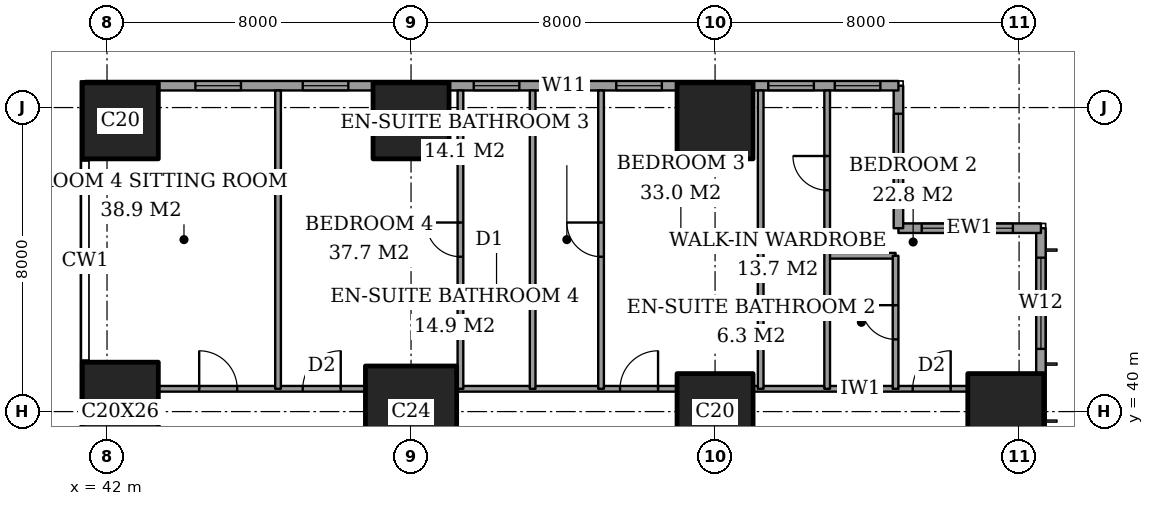
"""IFC4 building model, lengths in metres.
Left out: names, types, materials, properties, quantities, classifications, styles, units other than length and angle.
Written with IfcOpenShell. Run it as: python <this file> out.ifc"""

import sys

from ifc_helpers import new_model, si_unit, direction, frame, frame_2d, origin, origin_2d, place, context, subcontext, project, spatial, rectangle, extrude, element, fill, save


model = new_model("IFC4")
c1 = context("Model", 3, precision=1e-05, world=origin(), true_north=direction((0.0, 1.0)))
c2 = subcontext(c1, "Body", "Model", "MODEL_VIEW")
j1 = project(units=[si_unit("LENGTHUNIT", "METRE"), si_unit("PLANEANGLEUNIT", "RADIAN")], contexts=[c1])
p1 = place(None, origin())
s1 = spatial("IfcSite", under=j1, at=p1, CompositionType="ELEMENT")
p2 = place(p1, origin())
s2 = spatial("IfcBuilding", under=s1, at=p2, CompositionType="ELEMENT")
p3 = place(p2, frame((0.0, 0.0, 164.6)))
s3 = spatial("IfcBuildingStorey", under=s2, at=p3, CompositionType="ELEMENT", Elevation=164.6)
p4 = place(p3, frame((42.35, 40.0, 0.0), z_axis=(0.0, 0.0, 1.0), x_axis=(1.0, 0.0, 0.0)))
e1 = element("IfcColumn", 1, at=p4, inside=s3, PredefinedType="COLUMN", context=c2, shape_type="SweptSolid", body=[
    extrude(rectangle(XDim=2.0, YDim=2.6, at=origin_2d()), origin(), (0.0, 0.0, 1.0), 3.6),
])
p5 = place(p3, frame((42.35, 47.65, 0.0), z_axis=(0.0, 0.0, 1.0), x_axis=(1.0, 0.0, 0.0)))
e2 = element("IfcColumn", 2, at=p5, inside=s3, PredefinedType="COLUMN", context=c2, shape_type="SweptSolid", body=[
    extrude(rectangle(XDim=2.0, YDim=2.0, at=origin_2d()), origin(), (0.0, 0.0, 1.0), 3.6),
])
p6 = place(p3, frame((50.0, 40.0, 0.0), z_axis=(0.0, 0.0, 1.0), x_axis=(1.0, 0.0, 0.0)))
e3 = element("IfcColumn", 3, at=p6, inside=s3, PredefinedType="COLUMN", context=c2, shape_type="SweptSolid", body=[
    extrude(rectangle(XDim=2.4, YDim=2.4, at=origin_2d()), origin(), (0.0, 0.0, 1.0), 3.6),
])
for number, where, z_axis, x_axis in (
    (4, (50.0, 47.65, 0.0), (0.0, 0.0, 1.0), (1.0, 0.0, 0.0)),
    (5, (58.0, 40.0, 0.0), (0.0, 0.0, 1.0), (1.0, 0.0, 0.0)),
    (6, (58.0, 47.65, 0.0), (0.0, 0.0, 1.0), (1.0, 0.0, 0.0)),
    (7, (65.65, 40.0, 0.0), (0.0, 0.0, 1.0), (1.0, 0.0, 0.0)),
):
    element("IfcColumn", number, at=place(p3, frame(where, z_axis=z_axis, x_axis=x_axis)), inside=s3, PredefinedType="COLUMN", context=c2, shape_type="SweptSolid", body=[
        extrude(rectangle(XDim=2.0, YDim=2.0, at=origin_2d()), origin(), (0.0, 0.0, 1.0), 3.6),
    ])
p7 = place(p3, frame((66.575, 3.175, 0.0), z_axis=(0.0, 0.0, 1.0), x_axis=(0.0, 1.0, 0.0)))
e8 = element("IfcWall", 8, at=p7, inside=s3, PredefinedType="SOLIDWALL", context=c2, shape_type="SweptSolid", body=[
    extrude(rectangle(XDim=41.65, YDim=0.25, at=frame_2d((20.825, 0.0))), origin(), (0.0, 0.0, 1.0), 3.6),
])
p8 = place(p7, frame((0.775, 0.0, 0.4)))
e9 = element("IfcOpeningElement", 9, at=p8, cuts=e8, PredefinedType="OPENING", context=c2, shape_type="SweptSolid", body=[
    extrude(rectangle(XDim=2.4, YDim=2.2, at=frame_2d((1.2, 1.1))), frame((0.0, 0.135, 0.0), z_axis=(0.0, -1.0, 0.0), x_axis=(1.0, 0.0, 0.0)), (0.0, 0.0, 1.0), 0.27),
])
p9 = place(p7, frame((6.225, 0.0, 0.4)))
e10 = element("IfcOpeningElement", 10, at=p9, cuts=e8, PredefinedType="OPENING", context=c2, shape_type="SweptSolid", body=[
    extrude(rectangle(XDim=1.2, YDim=2.2, at=frame_2d((0.6, 1.1))), frame((0.0, 0.135, 0.0), z_axis=(0.0, -1.0, 0.0), x_axis=(1.0, 0.0, 0.0)), (0.0, 0.0, 1.0), 0.27),
])
p10 = place(p7, frame((8.475, 0.0, 0.4)))
e11 = element("IfcOpeningElement", 11, at=p10, cuts=e8, PredefinedType="OPENING", context=c2, shape_type="SweptSolid", body=[
    extrude(rectangle(XDim=2.4, YDim=2.2, at=frame_2d((1.2, 1.1))), frame((0.0, 0.135, 0.0), z_axis=(0.0, -1.0, 0.0), x_axis=(1.0, 0.0, 0.0)), (0.0, 0.0, 1.0), 0.27),
])
p11 = place(p7, frame((15.775, 0.0, 0.4)))
e12 = element("IfcOpeningElement", 12, at=p11, cuts=e8, PredefinedType="OPENING", context=c2, shape_type="SweptSolid", body=[
    extrude(rectangle(XDim=2.4, YDim=2.2, at=frame_2d((1.2, 1.1))), frame((0.0, 0.135, 0.0), z_axis=(0.0, -1.0, 0.0), x_axis=(1.0, 0.0, 0.0)), (0.0, 0.0, 1.0), 0.27),
])
p12 = place(p7, frame((23.475, 0.0, 0.4)))
e13 = element("IfcOpeningElement", 13, at=p12, cuts=e8, PredefinedType="OPENING", context=c2, shape_type="SweptSolid", body=[
    extrude(rectangle(XDim=2.4, YDim=2.2, at=frame_2d((1.2, 1.1))), frame((0.0, 0.135, 0.0), z_axis=(0.0, -1.0, 0.0), x_axis=(1.0, 0.0, 0.0)), (0.0, 0.0, 1.0), 0.27),
])
p13 = place(p7, frame((30.975, 0.0, 0.4)))
e14 = element("IfcOpeningElement", 14, at=p13, cuts=e8, PredefinedType="OPENING", context=c2, shape_type="SweptSolid", body=[
    extrude(rectangle(XDim=2.4, YDim=2.2, at=frame_2d((1.2, 1.1))), frame((0.0, 0.135, 0.0), z_axis=(0.0, -1.0, 0.0), x_axis=(1.0, 0.0, 0.0)), (0.0, 0.0, 1.0), 0.27),
])
p14 = place(p7, frame((34.5, 0.0, 0.4)))
e15 = element("IfcOpeningElement", 15, at=p14, cuts=e8, PredefinedType="OPENING", context=c2, shape_type="SweptSolid", body=[
    extrude(rectangle(XDim=1.2, YDim=2.2, at=frame_2d((0.6, 1.1))), frame((0.0, 0.135, 0.0), z_axis=(0.0, -1.0, 0.0), x_axis=(1.0, 0.0, 0.0)), (0.0, 0.0, 1.0), 0.27),
])
p15 = place(p7, frame((38.475, 0.0, 0.4)))
e16 = element("IfcOpeningElement", 16, at=p15, cuts=e8, PredefinedType="OPENING", context=c2, shape_type="SweptSolid", body=[
    extrude(rectangle(XDim=2.4, YDim=2.2, at=frame_2d((1.2, 1.1))), frame((0.0, 0.135, 0.0), z_axis=(0.0, -1.0, 0.0), x_axis=(1.0, 0.0, 0.0)), (0.0, 0.0, 1.0), 0.27),
])
p16 = place(p3, frame((66.575, 44.825, 0.0), z_axis=(0.0, 0.0, 1.0), x_axis=(-1.0, 0.0, 0.0)))
e17 = element("IfcWall", 17, at=p16, inside=s3, PredefinedType="SOLIDWALL", context=c2, shape_type="SweptSolid", body=[
    extrude(rectangle(XDim=3.75, YDim=0.25, at=frame_2d((1.875, 0.0))), origin(), (0.0, 0.0, 1.0), 3.6),
])
p17 = place(p16, frame((0.738, 0.0, 0.4)))
e18 = element("IfcOpeningElement", 18, at=p17, cuts=e17, PredefinedType="OPENING", context=c2, shape_type="SweptSolid", body=[
    extrude(rectangle(XDim=2.4, YDim=2.2, at=frame_2d((1.2, 1.1))), frame((0.0, 0.135, 0.0), z_axis=(0.0, -1.0, 0.0), x_axis=(1.0, 0.0, 0.0)), (0.0, 0.0, 1.0), 0.27),
])
p18 = place(p3, frame((62.825, 44.825, 0.0), z_axis=(0.0, 0.0, 1.0), x_axis=(0.0, 1.0, 0.0)))
e19 = element("IfcWall", 19, at=p18, inside=s3, PredefinedType="SOLIDWALL", context=c2, shape_type="SweptSolid", body=[
    extrude(rectangle(XDim=3.75, YDim=0.25, at=frame_2d((1.875, 0.0))), origin(), (0.0, 0.0, 1.0), 3.6),
])
p19 = place(p18, frame((0.613, 0.0, 0.4)))
e20 = element("IfcOpeningElement", 20, at=p19, cuts=e19, PredefinedType="OPENING", context=c2, shape_type="SweptSolid", body=[
    extrude(rectangle(XDim=2.4, YDim=2.2, at=frame_2d((1.2, 1.1))), frame((0.0, 0.135, 0.0), z_axis=(0.0, -1.0, 0.0), x_axis=(1.0, 0.0, 0.0)), (0.0, 0.0, 1.0), 0.27),
])
p20 = place(p3, frame((62.825, 48.575, 0.0), z_axis=(0.0, 0.0, 1.0), x_axis=(-1.0, 0.0, 0.0)))
e21 = element("IfcWall", 21, at=p20, inside=s3, PredefinedType="SOLIDWALL", context=c2, shape_type="SweptSolid", body=[
    extrude(rectangle(XDim=21.4, YDim=0.25, at=frame_2d((10.7, 0.0))), origin(), (0.0, 0.0, 1.0), 3.6),
])
p21 = place(p20, frame((0.475, 0.0, 0.4)))
e22 = element("IfcOpeningElement", 22, at=p21, cuts=e21, PredefinedType="OPENING", context=c2, shape_type="SweptSolid", body=[
    extrude(rectangle(XDim=1.2, YDim=2.2, at=frame_2d((0.6, 1.1))), frame((0.0, 0.135, 0.0), z_axis=(0.0, -1.0, 0.0), x_axis=(1.0, 0.0, 0.0)), (0.0, 0.0, 1.0), 0.27),
])
p22 = place(p20, frame((2.225, 0.0, 0.4)))
e23 = element("IfcOpeningElement", 23, at=p22, cuts=e21, PredefinedType="OPENING", context=c2, shape_type="SweptSolid", body=[
    extrude(rectangle(XDim=1.2, YDim=2.2, at=frame_2d((0.6, 1.1))), frame((0.0, 0.135, 0.0), z_axis=(0.0, -1.0, 0.0), x_axis=(1.0, 0.0, 0.0)), (0.0, 0.0, 1.0), 0.27),
])
p23 = place(p20, frame((6.225, 0.0, 0.4)))
e24 = element("IfcOpeningElement", 24, at=p23, cuts=e21, PredefinedType="OPENING", context=c2, shape_type="SweptSolid", body=[
    extrude(rectangle(XDim=1.2, YDim=2.2, at=frame_2d((0.6, 1.1))), frame((0.0, 0.135, 0.0), z_axis=(0.0, -1.0, 0.0), x_axis=(1.0, 0.0, 0.0)), (0.0, 0.0, 1.0), 0.27),
])
p24 = place(p20, frame((8.2, 0.0, 0.4)))
e25 = element("IfcOpeningElement", 25, at=p24, cuts=e21, PredefinedType="OPENING", context=c2, shape_type="SweptSolid", body=[
    extrude(rectangle(XDim=1.2, YDim=2.2, at=frame_2d((0.6, 1.1))), frame((0.0, 0.135, 0.0), z_axis=(0.0, -1.0, 0.0), x_axis=(1.0, 0.0, 0.0)), (0.0, 0.0, 1.0), 0.27),
])
p25 = place(p20, frame((9.975, 0.0, 0.4)))
e26 = element("IfcOpeningElement", 26, at=p25, cuts=e21, PredefinedType="OPENING", context=c2, shape_type="SweptSolid", body=[
    extrude(rectangle(XDim=1.2, YDim=2.2, at=frame_2d((0.6, 1.1))), frame((0.0, 0.135, 0.0), z_axis=(0.0, -1.0, 0.0), x_axis=(1.0, 0.0, 0.0)), (0.0, 0.0, 1.0), 0.27),
])
p26 = place(p20, frame((14.475, 0.0, 0.4)))
e27 = element("IfcOpeningElement", 27, at=p26, cuts=e21, PredefinedType="OPENING", context=c2, shape_type="SweptSolid", body=[
    extrude(rectangle(XDim=1.2, YDim=2.2, at=frame_2d((0.6, 1.1))), frame((0.0, 0.135, 0.0), z_axis=(0.0, -1.0, 0.0), x_axis=(1.0, 0.0, 0.0)), (0.0, 0.0, 1.0), 0.27),
])
p27 = place(p20, frame((17.3, 0.0, 0.4)))
e28 = element("IfcOpeningElement", 28, at=p27, cuts=e21, PredefinedType="OPENING", context=c2, shape_type="SweptSolid", body=[
    extrude(rectangle(XDim=1.2, YDim=2.2, at=frame_2d((0.6, 1.1))), frame((0.0, 0.135, 0.0), z_axis=(0.0, -1.0, 0.0), x_axis=(1.0, 0.0, 0.0)), (0.0, 0.0, 1.0), 0.27),
])
p28 = place(p3, frame((43.35, 40.6, 0.0), z_axis=(0.0, 0.0, 1.0), x_axis=(1.0, 0.0, 0.0)))
e29 = element("IfcWall", 29, at=p28, inside=s3, PredefinedType="PARTITIONING", context=c2, shape_type="SweptSolid", body=[
    extrude(rectangle(XDim=5.45, YDim=0.15, at=frame_2d((2.725, 0.0))), origin(), (0.0, 0.0, 1.0), 3.35),
])
p29 = place(p28, frame((3.8, 0.0, 0.0)))
e30 = element("IfcOpeningElement", 30, at=p29, cuts=e29, PredefinedType="OPENING", context=c2, shape_type="SweptSolid", body=[
    extrude(rectangle(XDim=1.0, YDim=2.1, at=frame_2d((0.5, 1.05))), frame((0.0, 0.085, 0.0), z_axis=(0.0, -1.0, 0.0), x_axis=(1.0, 0.0, 0.0)), (0.0, 0.0, 1.0), 0.17),
])
p30 = place(p28, frame((1.075, 0.0, 0.0)))
e31 = element("IfcOpeningElement", 31, at=p30, cuts=e29, PredefinedType="OPENING", context=c2, shape_type="SweptSolid", body=[
    extrude(rectangle(XDim=1.0, YDim=2.1, at=frame_2d((0.5, 1.05))), frame((0.0, 0.085, 0.0), z_axis=(0.0, -1.0, 0.0), x_axis=(1.0, 0.0, 0.0)), (0.0, 0.0, 1.0), 0.17),
])
p31 = place(p3, frame((51.2, 40.6, 0.0), z_axis=(0.0, 0.0, 1.0), x_axis=(1.0, 0.0, 0.0)))
e32 = element("IfcWall", 32, at=p31, inside=s3, PredefinedType="PARTITIONING", context=c2, shape_type="SweptSolid", body=[
    extrude(rectangle(XDim=5.8, YDim=0.15, at=frame_2d((2.9, 0.0))), origin(), (0.0, 0.0, 1.0), 3.35),
])
p32 = place(p31, frame((4.3, 0.0, 0.0)))
e33 = element("IfcOpeningElement", 33, at=p32, cuts=e32, PredefinedType="OPENING", context=c2, shape_type="SweptSolid", body=[
    extrude(rectangle(XDim=1.0, YDim=2.1, at=frame_2d((0.5, 1.05))), frame((0.0, 0.085, 0.0), z_axis=(0.0, -1.0, 0.0), x_axis=(1.0, 0.0, 0.0)), (0.0, 0.0, 1.0), 0.17),
])
p33 = place(p3, frame((59.0, 40.6, 0.0), z_axis=(0.0, 0.0, 1.0), x_axis=(1.0, 0.0, 0.0)))
e34 = element("IfcWall", 34, at=p33, inside=s3, PredefinedType="PARTITIONING", context=c2, shape_type="SweptSolid", body=[
    extrude(rectangle(XDim=5.65, YDim=0.15, at=frame_2d((2.825, 0.0))), origin(), (0.0, 0.0, 1.0), 3.35),
])
p34 = place(p33, frame((4.2, 0.0, 0.0)))
e35 = element("IfcOpeningElement", 35, at=p34, cuts=e34, PredefinedType="OPENING", context=c2, shape_type="SweptSolid", body=[
    extrude(rectangle(XDim=1.0, YDim=2.1, at=frame_2d((0.5, 1.05))), frame((0.0, 0.085, 0.0), z_axis=(0.0, -1.0, 0.0), x_axis=(1.0, 0.0, 0.0)), (0.0, 0.0, 1.0), 0.17),
])
p35 = place(p3, frame((60.95, 44.1, 0.0), z_axis=(0.0, 0.0, 1.0), x_axis=(1.0, 0.0, 0.0)))
e36 = element("IfcWall", 36, at=p35, inside=s3, PredefinedType="PARTITIONING", context=c2, shape_type="SweptSolid", body=[
    extrude(rectangle(XDim=1.8, YDim=0.15, at=frame_2d((0.9, 0.0))), origin(), (0.0, 0.0, 1.0), 3.35),
])
p36 = place(p3, frame((46.5, 40.6, 0.0), z_axis=(0.0, 0.0, 1.0), x_axis=(0.0, 1.0, 0.0)))
e37 = element("IfcWall", 37, at=p36, inside=s3, PredefinedType="PARTITIONING", context=c2, shape_type="SweptSolid", body=[
    extrude(rectangle(XDim=7.85, YDim=0.15, at=frame_2d((3.925, 0.0))), origin(), (0.0, 0.0, 1.0), 3.35),
])
p37 = place(p3, frame((51.3, 40.6, 0.0), z_axis=(0.0, 0.0, 1.0), x_axis=(0.0, 1.0, 0.0)))
e38 = element("IfcWall", 38, at=p37, inside=s3, PredefinedType="PARTITIONING", context=c2, shape_type="SweptSolid", body=[
    extrude(rectangle(XDim=7.85, YDim=0.15, at=frame_2d((3.925, 0.0))), origin(), (0.0, 0.0, 1.0), 3.35),
])
p38 = place(p37, frame((3.475, 0.0, 0.0)))
e39 = element("IfcOpeningElement", 39, at=p38, cuts=e38, PredefinedType="OPENING", context=c2, shape_type="SweptSolid", body=[
    extrude(rectangle(XDim=0.9, YDim=2.1, at=frame_2d((0.45, 1.05))), frame((0.0, 0.085, 0.0), z_axis=(0.0, -1.0, 0.0), x_axis=(1.0, 0.0, 0.0)), (0.0, 0.0, 1.0), 0.17),
])
p39 = place(p3, frame((53.2, 40.6, 0.0), z_axis=(0.0, 0.0, 1.0), x_axis=(0.0, 1.0, 0.0)))
e40 = element("IfcWall", 40, at=p39, inside=s3, PredefinedType="PARTITIONING", context=c2, shape_type="SweptSolid", body=[
    extrude(rectangle(XDim=7.85, YDim=0.15, at=frame_2d((3.925, 0.0))), origin(), (0.0, 0.0, 1.0), 3.35),
])
p40 = place(p3, frame((55.0, 40.6, 0.0), z_axis=(0.0, 0.0, 1.0), x_axis=(0.0, 1.0, 0.0)))
e41 = element("IfcWall", 41, at=p40, inside=s3, PredefinedType="PARTITIONING", context=c2, shape_type="SweptSolid", body=[
    extrude(rectangle(XDim=7.85, YDim=0.15, at=frame_2d((3.925, 0.0))), origin(), (0.0, 0.0, 1.0), 3.35),
])
p41 = place(p40, frame((3.475, 0.0, 0.0)))
e42 = element("IfcOpeningElement", 42, at=p41, cuts=e41, PredefinedType="OPENING", context=c2, shape_type="SweptSolid", body=[
    extrude(rectangle(XDim=0.9, YDim=2.1, at=frame_2d((0.45, 1.05))), frame((0.0, 0.085, 0.0), z_axis=(0.0, -1.0, 0.0), x_axis=(1.0, 0.0, 0.0)), (0.0, 0.0, 1.0), 0.17),
])
p42 = place(p3, frame((59.2, 40.6, 0.0), z_axis=(0.0, 0.0, 1.0), x_axis=(0.0, 1.0, 0.0)))
e43 = element("IfcWall", 43, at=p42, inside=s3, PredefinedType="PARTITIONING", context=c2, shape_type="SweptSolid", body=[
    extrude(rectangle(XDim=7.85, YDim=0.15, at=frame_2d((3.925, 0.0))), origin(), (0.0, 0.0, 1.0), 3.35),
])
p43 = place(p3, frame((60.95, 40.6, 0.0), z_axis=(0.0, 0.0, 1.0), x_axis=(0.0, 1.0, 0.0)))
e44 = element("IfcWall", 44, at=p43, inside=s3, PredefinedType="PARTITIONING", context=c2, shape_type="SweptSolid", body=[
    extrude(rectangle(XDim=7.85, YDim=0.15, at=frame_2d((3.925, 0.0))), origin(), (0.0, 0.0, 1.0), 3.35),
])
p44 = place(p43, frame((5.225, 0.0, 0.0)))
e45 = element("IfcOpeningElement", 45, at=p44, cuts=e44, PredefinedType="OPENING", context=c2, shape_type="SweptSolid", body=[
    extrude(rectangle(XDim=0.9, YDim=2.1, at=frame_2d((0.45, 1.05))), frame((0.0, 0.085, 0.0), z_axis=(0.0, -1.0, 0.0), x_axis=(1.0, 0.0, 0.0)), (0.0, 0.0, 1.0), 0.17),
])
p45 = place(p3, frame((62.75, 40.6, 0.0), z_axis=(0.0, 0.0, 1.0), x_axis=(0.0, 1.0, 0.0)))
e46 = element("IfcWall", 46, at=p45, inside=s3, PredefinedType="PARTITIONING", context=c2, shape_type="SweptSolid", body=[
    extrude(rectangle(XDim=3.5, YDim=0.15, at=frame_2d((1.75, 0.0))), origin(), (0.0, 0.0, 1.0), 3.35),
])
p46 = place(p45, frame((1.3, 0.0, 0.0)))
e47 = element("IfcOpeningElement", 47, at=p46, cuts=e46, PredefinedType="OPENING", context=c2, shape_type="SweptSolid", body=[
    extrude(rectangle(XDim=0.9, YDim=2.1, at=frame_2d((0.45, 1.05))), frame((0.0, 0.085, 0.0), z_axis=(0.0, -1.0, 0.0), x_axis=(1.0, 0.0, 0.0)), (0.0, 0.0, 1.0), 0.17),
])
p47 = place(p15, origin())
e48 = element("IfcWindow", 48, at=p47, inside=s3, PartitioningType="SINGLE_PANEL", PredefinedType="WINDOW", context=c2, shape_type="SweptSolid", body=[
    extrude(rectangle(XDim=2.4, YDim=2.2, at=frame_2d((1.2, 1.1))), frame((0.0, 0.03, 0.0), z_axis=(0.0, -1.0, 0.0), x_axis=(1.0, 0.0, 0.0)), (0.0, 0.0, 1.0), 0.06),
])
fill(e16, e48)
p48 = place(p17, origin())
e49 = element("IfcWindow", 49, at=p48, inside=s3, PartitioningType="SINGLE_PANEL", PredefinedType="WINDOW", context=c2, shape_type="SweptSolid", body=[
    extrude(rectangle(XDim=2.4, YDim=2.2, at=frame_2d((1.2, 1.1))), frame((0.0, 0.03, 0.0), z_axis=(0.0, -1.0, 0.0), x_axis=(1.0, 0.0, 0.0)), (0.0, 0.0, 1.0), 0.06),
])
fill(e18, e49)
p49 = place(p19, origin())
e50 = element("IfcWindow", 50, at=p49, inside=s3, PartitioningType="SINGLE_PANEL", PredefinedType="WINDOW", context=c2, shape_type="SweptSolid", body=[
    extrude(rectangle(XDim=2.4, YDim=2.2, at=frame_2d((1.2, 1.1))), frame((0.0, 0.03, 0.0), z_axis=(0.0, -1.0, 0.0), x_axis=(1.0, 0.0, 0.0)), (0.0, 0.0, 1.0), 0.06),
])
fill(e20, e50)
p50 = place(p21, origin())
e51 = element("IfcWindow", 51, at=p50, inside=s3, PartitioningType="SINGLE_PANEL", PredefinedType="WINDOW", context=c2, shape_type="SweptSolid", body=[
    extrude(rectangle(XDim=1.2, YDim=2.2, at=frame_2d((0.6, 1.1))), frame((0.0, 0.03, 0.0), z_axis=(0.0, -1.0, 0.0), x_axis=(1.0, 0.0, 0.0)), (0.0, 0.0, 1.0), 0.06),
])
fill(e22, e51)
p51 = place(p22, origin())
e52 = element("IfcWindow", 52, at=p51, inside=s3, PartitioningType="SINGLE_PANEL", PredefinedType="WINDOW", context=c2, shape_type="SweptSolid", body=[
    extrude(rectangle(XDim=1.2, YDim=2.2, at=frame_2d((0.6, 1.1))), frame((0.0, 0.03, 0.0), z_axis=(0.0, -1.0, 0.0), x_axis=(1.0, 0.0, 0.0)), (0.0, 0.0, 1.0), 0.06),
])
fill(e23, e52)
p52 = place(p23, origin())
e53 = element("IfcWindow", 53, at=p52, inside=s3, PartitioningType="SINGLE_PANEL", PredefinedType="WINDOW", context=c2, shape_type="SweptSolid", body=[
    extrude(rectangle(XDim=1.2, YDim=2.2, at=frame_2d((0.6, 1.1))), frame((0.0, 0.03, 0.0), z_axis=(0.0, -1.0, 0.0), x_axis=(1.0, 0.0, 0.0)), (0.0, 0.0, 1.0), 0.06),
])
fill(e24, e53)
p53 = place(p24, origin())
e54 = element("IfcWindow", 54, at=p53, inside=s3, PartitioningType="SINGLE_PANEL", PredefinedType="WINDOW", context=c2, shape_type="SweptSolid", body=[
    extrude(rectangle(XDim=1.2, YDim=2.2, at=frame_2d((0.6, 1.1))), frame((0.0, 0.03, 0.0), z_axis=(0.0, -1.0, 0.0), x_axis=(1.0, 0.0, 0.0)), (0.0, 0.0, 1.0), 0.06),
])
fill(e25, e54)
p54 = place(p25, origin())
e55 = element("IfcWindow", 55, at=p54, inside=s3, PartitioningType="SINGLE_PANEL", PredefinedType="WINDOW", context=c2, shape_type="SweptSolid", body=[
    extrude(rectangle(XDim=1.2, YDim=2.2, at=frame_2d((0.6, 1.1))), frame((0.0, 0.03, 0.0), z_axis=(0.0, -1.0, 0.0), x_axis=(1.0, 0.0, 0.0)), (0.0, 0.0, 1.0), 0.06),
])
fill(e26, e55)
p55 = place(p26, origin())
e56 = element("IfcWindow", 56, at=p55, inside=s3, PartitioningType="SINGLE_PANEL", PredefinedType="WINDOW", context=c2, shape_type="SweptSolid", body=[
    extrude(rectangle(XDim=1.2, YDim=2.2, at=frame_2d((0.6, 1.1))), frame((0.0, 0.03, 0.0), z_axis=(0.0, -1.0, 0.0), x_axis=(1.0, 0.0, 0.0)), (0.0, 0.0, 1.0), 0.06),
])
fill(e27, e56)
p56 = place(p27, origin())
e57 = element("IfcWindow", 57, at=p56, inside=s3, PartitioningType="SINGLE_PANEL", PredefinedType="WINDOW", context=c2, shape_type="SweptSolid", body=[
    extrude(rectangle(XDim=1.2, YDim=2.2, at=frame_2d((0.6, 1.1))), frame((0.0, 0.03, 0.0), z_axis=(0.0, -1.0, 0.0), x_axis=(1.0, 0.0, 0.0)), (0.0, 0.0, 1.0), 0.06),
])
fill(e28, e57)
p57 = place(p46, origin())
e58 = element("IfcDoor", 58, at=p57, inside=s3, OperationType="SINGLE_SWING_LEFT", PredefinedType="DOOR", context=c2, shape_type="SweptSolid", body=[
    extrude(rectangle(XDim=0.9, YDim=2.1, at=frame_2d((0.45, 1.05))), frame((0.0, 0.025, 0.0), z_axis=(0.0, -1.0, 0.0), x_axis=(1.0, 0.0, 0.0)), (0.0, 0.0, 1.0), 0.05),
])
fill(e47, e58)
p58 = place(p34, origin())
e59 = element("IfcDoor", 59, at=p58, inside=s3, OperationType="SINGLE_SWING_LEFT", PredefinedType="DOOR", context=c2, shape_type="SweptSolid", body=[
    extrude(rectangle(XDim=1.0, YDim=2.1, at=frame_2d((0.5, 1.05))), frame((0.0, 0.025, 0.0), z_axis=(0.0, -1.0, 0.0), x_axis=(1.0, 0.0, 0.0)), (0.0, 0.0, 1.0), 0.05),
])
fill(e35, e59)
p59 = place(p44, origin())
e60 = element("IfcDoor", 60, at=p59, inside=s3, OperationType="SINGLE_SWING_LEFT", PredefinedType="DOOR", context=c2, shape_type="SweptSolid", body=[
    extrude(rectangle(XDim=0.9, YDim=2.1, at=frame_2d((0.45, 1.05))), frame((0.0, 0.025, 0.0), z_axis=(0.0, -1.0, 0.0), x_axis=(1.0, 0.0, 0.0)), (0.0, 0.0, 1.0), 0.05),
])
fill(e45, e60)
p60 = place(p32, origin())
e61 = element("IfcDoor", 61, at=p60, inside=s3, OperationType="SINGLE_SWING_LEFT", PredefinedType="DOOR", context=c2, shape_type="SweptSolid", body=[
    extrude(rectangle(XDim=1.0, YDim=2.1, at=frame_2d((0.5, 1.05))), frame((0.0, 0.025, 0.0), z_axis=(0.0, -1.0, 0.0), x_axis=(1.0, 0.0, 0.0)), (0.0, 0.0, 1.0), 0.05),
])
fill(e33, e61)
p61 = place(p41, origin())
e62 = element("IfcDoor", 62, at=p61, inside=s3, OperationType="SINGLE_SWING_LEFT", PredefinedType="DOOR", context=c2, shape_type="SweptSolid", body=[
    extrude(rectangle(XDim=0.9, YDim=2.1, at=frame_2d((0.45, 1.05))), frame((0.0, 0.025, 0.0), z_axis=(0.0, -1.0, 0.0), x_axis=(1.0, 0.0, 0.0)), (0.0, 0.0, 1.0), 0.05),
])
fill(e42, e62)
p62 = place(p38, origin())
e63 = element("IfcDoor", 63, at=p62, inside=s3, OperationType="SINGLE_SWING_LEFT", PredefinedType="DOOR", context=c2, shape_type="SweptSolid", body=[
    extrude(rectangle(XDim=0.9, YDim=2.1, at=frame_2d((0.45, 1.05))), frame((0.0, 0.025, 0.0), z_axis=(0.0, -1.0, 0.0), x_axis=(1.0, 0.0, 0.0)), (0.0, 0.0, 1.0), 0.05),
])
fill(e39, e63)
p63 = place(p29, origin())
e64 = element("IfcDoor", 64, at=p63, inside=s3, OperationType="SINGLE_SWING_LEFT", PredefinedType="DOOR", context=c2, shape_type="SweptSolid", body=[
    extrude(rectangle(XDim=1.0, YDim=2.1, at=frame_2d((0.5, 1.05))), frame((0.0, 0.025, 0.0), z_axis=(0.0, -1.0, 0.0), x_axis=(1.0, 0.0, 0.0)), (0.0, 0.0, 1.0), 0.05),
])
fill(e30, e64)
p64 = place(p30, origin())
e65 = element("IfcDoor", 65, at=p64, inside=s3, OperationType="SINGLE_SWING_RIGHT", PredefinedType="DOOR", context=c2, shape_type="SweptSolid", body=[
    extrude(rectangle(XDim=1.0, YDim=2.1, at=frame_2d((0.5, 1.05))), frame((0.0, 0.025, 0.0), z_axis=(0.0, -1.0, 0.0), x_axis=(1.0, 0.0, 0.0)), (0.0, 0.0, 1.0), 0.05),
])
fill(e31, e65)
save(model, sys.argv[1])
